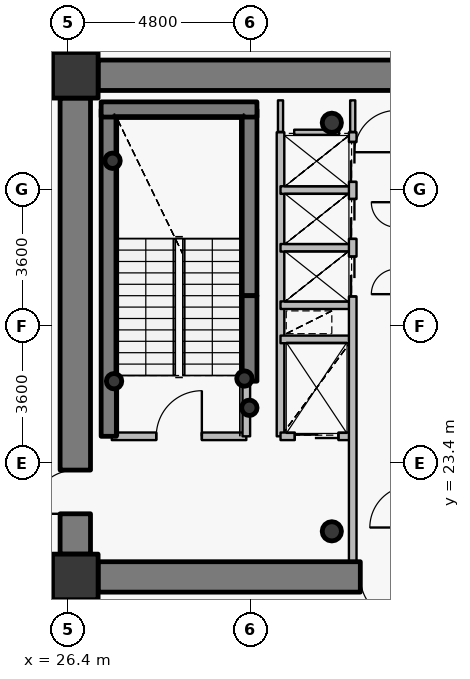
"""IFC4 building model, lengths in metres.
Left out: names, types, materials, properties, quantities, classifications, styles, units other than length and angle.
Written with IfcOpenShell. Run it as: python <this file> out.ifc"""

import sys

from ifc_helpers import new_model, si_unit, direction, frame, frame_2d, origin, origin_2d, place, context, subcontext, project, spatial, rectangle, hollow_circle, extrude, source, transform, mapped, element, fill, save


model = new_model("IFC4")
c1 = context("Model", 3, precision=1e-05, world=origin(), true_north=direction((0.0, 1.0)))
c2 = subcontext(c1, "Body", "Model", "MODEL_VIEW")
j1 = project(units=[si_unit("LENGTHUNIT", "METRE"), si_unit("PLANEANGLEUNIT", "RADIAN")], contexts=[c1])
p1 = place(None, origin())
s1 = spatial("IfcSite", under=j1, at=p1, CompositionType="ELEMENT")
p2 = place(p1, origin())
s2 = spatial("IfcBuilding", under=s1, at=p2, CompositionType="ELEMENT")
p3 = place(p2, frame((0.0, 0.0, 171.15)))
s3 = spatial("IfcBuildingStorey", under=s2, at=p3, CompositionType="ELEMENT", Elevation=171.15)
for number, where, z_axis, x_axis in (
    (1, (26.6, 20.4, 0.0), (0.0, 0.0, 1.0), (1.0, 0.0, 0.0)),
    (2, (26.6, 33.6, 0.0), (0.0, 0.0, 1.0), (1.0, 0.0, 0.0)),
):
    element("IfcColumn", number, at=place(p3, frame(where, z_axis=z_axis, x_axis=x_axis)), inside=s3, PredefinedType="COLUMN", context=c2, shape_type="SweptSolid", body=[
        extrude(rectangle(XDim=1.2, YDim=1.2, at=origin_2d()), origin(), (0.0, 0.0, 1.0), 3.75),
    ])
for number, where, z_axis, x_axis in (
    (3, (33.35, 21.6, 0.0), (0.0, 0.0, 1.0), (1.0, 0.0, 0.0)),
    (4, (33.35, 32.35, 0.0), (0.0, 0.0, 1.0), (1.0, 0.0, 0.0)),
):
    element("IfcColumn", number, at=place(p3, frame(where, z_axis=z_axis, x_axis=x_axis)), inside=s3, PredefinedType="COLUMN", context=c2, shape_type="SweptSolid", body=[
        extrude(hollow_circle(Radius=0.254, WallThickness=0.02, at=origin_2d()), origin(), (0.0, 0.0, 1.0), 3.75),
    ])
p4 = place(p3, frame((27.48, 24.1, 0.0), z_axis=(0.0, 0.0, 1.0), x_axis=(0.0, 1.0, 0.0)))
e5 = element("IfcWall", 5, at=p4, inside=s3, PredefinedType="SHEAR", context=c2, shape_type="SweptSolid", body=[
    extrude(rectangle(XDim=8.6, YDim=0.4, at=frame_2d((4.3, 0.0))), origin(), (0.0, 0.0, 1.0), 3.75),
])
p5 = place(p3, frame((31.18, 27.8, 0.0), z_axis=(0.0, 0.0, 1.0), x_axis=(0.0, 1.0, 0.0)))
e6 = element("IfcWall", 6, at=p5, inside=s3, PredefinedType="SHEAR", context=c2, shape_type="SweptSolid", body=[
    extrude(rectangle(XDim=4.9, YDim=0.4, at=frame_2d((2.45, 0.0))), origin(), (0.0, 0.0, 1.0), 3.75),
])
p6 = place(p3, frame((27.28, 32.7, 0.0), z_axis=(0.0, 0.0, 1.0), x_axis=(1.0, 0.0, 0.0)))
e7 = element("IfcWall", 7, at=p6, inside=s3, PredefinedType="SHEAR", context=c2, shape_type="SweptSolid", body=[
    extrude(rectangle(XDim=4.1, YDim=0.4, at=frame_2d((2.05, 0.0))), origin(), (0.0, 0.0, 1.0), 3.75),
])
for number, where, z_axis, x_axis in (
    (8, (27.58, 31.35, 0.0), (0.0, 0.0, 1.0), (1.0, 0.0, 0.0)),
    (9, (31.05, 25.62, 0.0), (0.0, 0.0, 1.0), (1.0, 0.0, 0.0)),
    (10, (31.18, 24.85, 0.0), (0.0, 0.0, 1.0), (1.0, 0.0, 0.0)),
    (11, (27.62, 25.55, 0.0), (0.0, 0.0, 1.0), (1.0, 0.0, 0.0)),
):
    element("IfcColumn", number, at=place(p3, frame(where, z_axis=z_axis, x_axis=x_axis)), inside=s3, PredefinedType="COLUMN", context=c2, shape_type="SweptSolid", body=[
        extrude(hollow_circle(Radius=0.203, WallThickness=0.016, at=origin_2d()), origin(), (0.0, 0.0, 1.0), 3.75),
    ])
p7 = place(p3, frame((27.2, 33.6, 0.0), z_axis=(0.0, 0.0, 1.0), x_axis=(1.0, 0.0, 0.0)))
e12 = element("IfcWall", 12, at=p7, inside=s3, PredefinedType="SHEAR", context=c2, shape_type="SweptSolid", body=[
    extrude(rectangle(XDim=17.6, YDim=0.8, at=frame_2d((8.8, 0.0))), origin(), (0.0, 0.0, 1.0), 2.95),
])
p8 = place(p7, frame((13.45, 0.0, 0.0)))
e13 = element("IfcOpeningElement", 13, at=p8, cuts=e12, PredefinedType="OPENING", context=c2, shape_type="SweptSolid", body=[
    extrude(rectangle(XDim=1.15, YDim=2.15, at=origin_2d()), frame((0.575, 0.41, 1.075), z_axis=(0.0, -1.0, 0.0), x_axis=(1.0, 0.0, 0.0)), (0.0, 0.0, 1.0), 0.82),
])
p9 = place(p3, frame((44.8, 20.4, 0.0), z_axis=(0.0, 0.0, 1.0), x_axis=(-1.0, 0.0, 0.0)))
e14 = element("IfcWall", 14, at=p9, inside=s3, PredefinedType="SHEAR", context=c2, shape_type="SweptSolid", body=[
    extrude(rectangle(XDim=17.6, YDim=0.8, at=frame_2d((8.8, 0.0))), origin(), (0.0, 0.0, 1.0), 2.95),
])
p10 = place(p9, frame((9.55, 0.0, 0.0)))
e15 = element("IfcOpeningElement", 15, at=p10, cuts=e14, PredefinedType="OPENING", context=c2, shape_type="SweptSolid", body=[
    extrude(rectangle(XDim=1.15, YDim=2.15, at=origin_2d()), frame((0.575, 0.41, 1.075), z_axis=(0.0, -1.0, 0.0), x_axis=(1.0, 0.0, 0.0)), (0.0, 0.0, 1.0), 0.82),
])
p11 = place(p3, frame((26.6, 21.0, 0.0), z_axis=(0.0, 0.0, 1.0), x_axis=(0.0, 1.0, 0.0)))
e16 = element("IfcWall", 16, at=p11, inside=s3, PredefinedType="SHEAR", context=c2, shape_type="SweptSolid", body=[
    extrude(rectangle(XDim=12.0, YDim=0.8, at=frame_2d((6.0, 0.0))), origin(), (0.0, 0.0, 1.0), 2.95),
])
p12 = place(p11, frame((1.061, 0.0, 0.0)))
e17 = element("IfcOpeningElement", 17, at=p12, cuts=e16, PredefinedType="OPENING", context=c2, shape_type="SweptSolid", body=[
    extrude(rectangle(XDim=1.15, YDim=2.15, at=origin_2d()), frame((0.575, 0.41, 1.075), z_axis=(0.0, -1.0, 0.0), x_axis=(1.0, 0.0, 0.0)), (0.0, 0.0, 1.0), 0.82),
])
p13 = place(p3, frame((31.18, 25.55, 0.0), z_axis=(0.0, 0.0, 1.0), x_axis=(0.0, 1.0, 0.0)))
e18 = element("IfcWall", 18, at=p13, inside=s3, PredefinedType="SHEAR", context=c2, shape_type="SweptSolid", body=[
    extrude(rectangle(XDim=2.25, YDim=0.4, at=frame_2d((1.125, 0.0))), origin(), (0.0, 0.0, 1.0), 3.1),
])
p14 = place(p3, frame((27.56, 24.1, 0.0), z_axis=(0.0, 0.0, 1.0), x_axis=(1.0, 0.0, 0.0)))
e19 = element("IfcWall", 19, at=p14, inside=s3, PredefinedType="PARTITIONING", context=c2, shape_type="SweptSolid", body=[
    extrude(rectangle(XDim=3.54, YDim=0.2, at=frame_2d((1.77, 0.0))), origin(), (0.0, 0.0, 1.0), 3.5),
])
p15 = place(p14, frame((1.17, 0.0, 0.0)))
e20 = element("IfcOpeningElement", 20, at=p15, cuts=e19, PredefinedType="OPENING", context=c2, shape_type="SweptSolid", body=[
    extrude(rectangle(XDim=1.2, YDim=2.15, at=origin_2d()), frame((0.6, 0.11, 1.075), z_axis=(0.0, -1.0, 0.0), x_axis=(1.0, 0.0, 0.0)), (0.0, 0.0, 1.0), 0.22),
])
p16 = place(p3, frame((31.1, 24.1, 0.0), z_axis=(0.0, 0.0, 1.0), x_axis=(0.0, 1.0, 0.0)))
e21 = element("IfcWall", 21, at=p16, inside=s3, PredefinedType="PARTITIONING", context=c2, shape_type="SweptSolid", body=[
    extrude(rectangle(XDim=1.44, YDim=0.2, at=frame_2d((0.72, 0.0))), origin(), (0.0, 0.0, 1.0), 3.5),
])
p17 = place(p3, frame((32.0, 24.1, 0.0), z_axis=(0.0, 0.0, 1.0), x_axis=(0.0, 1.0, 0.0)))
e22 = element("IfcWall", 22, at=p17, inside=s3, PredefinedType="PARTITIONING", context=c2, shape_type="SweptSolid", body=[
    extrude(rectangle(XDim=8.0, YDim=0.2, at=frame_2d((4.0, 0.0))), origin(), (0.0, 0.0, 1.0), 3.5),
])
p18 = place(p3, frame((32.0, 24.1, 0.0), z_axis=(0.0, 0.0, 1.0), x_axis=(1.0, 0.0, 0.0)))
e23 = element("IfcWall", 23, at=p18, inside=s3, PredefinedType="PARTITIONING", context=c2, shape_type="SweptSolid", body=[
    extrude(rectangle(XDim=1.9, YDim=0.2, at=frame_2d((0.95, 0.0))), origin(), (0.0, 0.0, 1.0), 3.085),
])
p19 = place(p18, frame((0.375, 0.0, 0.0)))
e24 = element("IfcOpeningElement", 24, at=p19, cuts=e23, PredefinedType="OPENING", context=c2, shape_type="SweptSolid", body=[
    extrude(rectangle(XDim=1.15, YDim=2.15, at=origin_2d()), frame((0.575, 0.11, 1.075), z_axis=(0.0, -1.0, 0.0), x_axis=(1.0, 0.0, 0.0)), (0.0, 0.0, 1.0), 0.22),
])
for number, where, z_axis, x_axis in (
    (25, (32.0, 26.65, 0.0), (0.0, 0.0, 1.0), (1.0, 0.0, 0.0)),
    (26, (32.0, 27.55, 0.0), (0.0, 0.0, 1.0), (1.0, 0.0, 0.0)),
    (27, (32.0, 29.06, 0.0), (0.0, 0.0, 1.0), (1.0, 0.0, 0.0)),
    (28, (32.0, 30.58, 0.0), (0.0, 0.0, 1.0), (1.0, 0.0, 0.0)),
):
    element("IfcWall", number, at=place(p3, frame(where, z_axis=z_axis, x_axis=x_axis)), inside=s3, PredefinedType="PARTITIONING", context=c2, shape_type="SweptSolid", body=[
        extrude(rectangle(XDim=1.9, YDim=0.2, at=frame_2d((0.95, 0.0))), origin(), (0.0, 0.0, 1.0), 3.085),
    ])
p20 = place(p3, frame((33.9, 20.8, 0.0), z_axis=(0.0, 0.0, 1.0), x_axis=(0.0, 1.0, 0.0)))
e29 = element("IfcWall", 29, at=p20, inside=s3, PredefinedType="PARTITIONING", context=c2, shape_type="SweptSolid", body=[
    extrude(rectangle(XDim=11.3, YDim=0.2, at=frame_2d((5.65, 0.0))), origin(), (0.0, 0.0, 1.0), 3.085),
])
p21 = place(p20, frame((6.98, 0.0, 0.0)))
e30 = element("IfcOpeningElement", 30, at=p21, cuts=e29, PredefinedType="OPENING", context=c2, shape_type="SweptSolid", body=[
    extrude(rectangle(XDim=1.05, YDim=2.15, at=origin_2d()), frame((0.525, 0.11, 1.075), z_axis=(0.0, -1.0, 0.0), x_axis=(1.0, 0.0, 0.0)), (0.0, 0.0, 1.0), 0.22),
])
p22 = place(p20, frame((8.495, 0.0, 0.0)))
e31 = element("IfcOpeningElement", 31, at=p22, cuts=e29, PredefinedType="OPENING", context=c2, shape_type="SweptSolid", body=[
    extrude(rectangle(XDim=1.05, YDim=2.15, at=origin_2d()), frame((0.525, 0.11, 1.075), z_axis=(0.0, -1.0, 0.0), x_axis=(1.0, 0.0, 0.0)), (0.0, 0.0, 1.0), 0.22),
])
p23 = place(p20, frame((9.995, 0.0, 0.0)))
e32 = element("IfcOpeningElement", 32, at=p23, cuts=e29, PredefinedType="OPENING", context=c2, shape_type="SweptSolid", body=[
    extrude(rectangle(XDim=1.05, YDim=2.15, at=origin_2d()), frame((0.525, 0.11, 1.075), z_axis=(0.0, -1.0, 0.0), x_axis=(1.0, 0.0, 0.0)), (0.0, 0.0, 1.0), 0.22),
])
p24 = place(p3, frame((32.36, 32.1, 0.0), z_axis=(0.0, 0.0, 1.0), x_axis=(1.0, 0.0, 0.0)))
e33 = element("IfcWall", 33, at=p24, inside=s3, PredefinedType="PARTITIONING", context=c2, shape_type="SweptSolid", body=[
    extrude(rectangle(XDim=1.18, YDim=0.135, at=frame_2d((0.59, 0.0))), origin(), (0.0, 0.0, 1.0), 3.085),
])
p25 = place(p3, frame((32.0, 32.94, 0.0), z_axis=(0.0, 0.0, 1.0), x_axis=(0.0, -1.0, 0.0)))
e34 = element("IfcWall", 34, at=p25, inside=s3, PredefinedType="PARTITIONING", context=c2, shape_type="SweptSolid", body=[
    extrude(rectangle(XDim=0.83, YDim=0.135, at=frame_2d((0.415, 0.0))), origin(), (0.0, 0.0, 1.0), 3.035),
])
p26 = place(p3, frame((33.9, 32.11, 0.0), z_axis=(0.0, 0.0, 1.0), x_axis=(0.0, 1.0, 0.0)))
e35 = element("IfcWall", 35, at=p26, inside=s3, PredefinedType="PARTITIONING", context=c2, shape_type="SweptSolid", body=[
    extrude(rectangle(XDim=0.83, YDim=0.135, at=frame_2d((0.415, 0.0))), origin(), (0.0, 0.0, 1.0), 3.085),
])
p27 = place(p3, frame((27.19, 34.0, 0.0), z_axis=(0.0, 0.0, 1.0), x_axis=(-1.0, 0.0, 0.0)))
e36 = element("IfcWall", 36, at=p27, inside=s3, PredefinedType="PARTITIONING", context=c2, shape_type="SweptSolid", body=[
    extrude(rectangle(XDim=0.99, YDim=0.135, at=frame_2d((0.495, 0.0))), origin(), (0.0, 0.0, 1.0), 2.935),
])
p28 = place(p3, frame((26.2, 33.692, 0.0), z_axis=(0.0, 0.0, 1.0), x_axis=(0.0, -1.0, 0.0)))
e37 = element("IfcWall", 37, at=p28, inside=s3, PredefinedType="PARTITIONING", context=c2, shape_type="SweptSolid", body=[
    extrude(rectangle(XDim=0.682, YDim=0.135, at=frame_2d((0.341, 0.0))), origin(), (0.0, 0.0, 1.0), 3.5),
])
p29 = place(p3, frame((26.2, 20.99, 0.0), z_axis=(0.0, 0.0, 1.0), x_axis=(0.0, -1.0, 0.0)))
e38 = element("IfcWall", 38, at=p29, inside=s3, PredefinedType="PARTITIONING", context=c2, shape_type="SweptSolid", body=[
    extrude(rectangle(XDim=0.99, YDim=0.135, at=frame_2d((0.495, 0.0))), origin(), (0.0, 0.0, 1.0), 3.5),
])
p30 = place(p3, frame((26.508, 20.0, 0.0), z_axis=(0.0, 0.0, 1.0), x_axis=(1.0, 0.0, 0.0)))
e39 = element("IfcWall", 39, at=p30, inside=s3, PredefinedType="PARTITIONING", context=c2, shape_type="SweptSolid", body=[
    extrude(rectangle(XDim=0.682, YDim=0.135, at=frame_2d((0.341, 0.0))), origin(), (0.0, 0.0, 1.0), 2.935),
])
m1 = source(origin(), c2, "Body", "SweptSolid", [
    extrude(rectangle(XDim=1.15, YDim=2.15, at=origin_2d()), frame((0.575, 0.025, 1.075), z_axis=(0.0, -1.0, 0.0), x_axis=(1.0, 0.0, 0.0)), (0.0, 0.0, 1.0), 0.05),
])
p31 = place(p12, origin())
e40 = element("IfcDoor", 40, at=p31, inside=s3, OperationType="SINGLE_SWING_LEFT", PredefinedType="DOOR", context=c2, shape_type="MappedRepresentation", body=[
    mapped(m1, transform((0.0, 0.0, 0.0), x_axis=(1.0, 0.0, 0.0), y_axis=(0.0, 1.0, 0.0), z_axis=(0.0, 0.0, 1.0), scale=1.0)),
])
fill(e17, e40)
p32 = place(p10, origin())
e41 = element("IfcDoor", 41, at=p32, inside=s3, OperationType="SINGLE_SWING_LEFT", PredefinedType="DOOR", context=c2, shape_type="MappedRepresentation", body=[
    mapped(m1, transform((0.0, 0.0, 0.0), x_axis=(1.0, 0.0, 0.0), y_axis=(0.0, 1.0, 0.0), z_axis=(0.0, 0.0, 1.0), scale=1.0)),
])
fill(e15, e41)
m2 = source(origin(), c2, "Body", "SweptSolid", [
    extrude(rectangle(XDim=1.2, YDim=2.15, at=origin_2d()), frame((0.6, 0.025, 1.075), z_axis=(0.0, -1.0, 0.0), x_axis=(1.0, 0.0, 0.0)), (0.0, 0.0, 1.0), 0.05),
])
p33 = place(p15, origin())
e42 = element("IfcDoor", 42, at=p33, inside=s3, OperationType="SINGLE_SWING_RIGHT", PredefinedType="DOOR", context=c2, shape_type="MappedRepresentation", body=[
    mapped(m2, transform((0.0, 0.0, 0.0), x_axis=(1.0, 0.0, 0.0), y_axis=(0.0, 1.0, 0.0), z_axis=(0.0, 0.0, 1.0), scale=1.0)),
])
fill(e20, e42)
m3 = source(origin(), c2, "Body", "SweptSolid", [
    extrude(rectangle(XDim=1.15, YDim=2.15, at=origin_2d()), frame((0.575, 0.025, 1.075), z_axis=(0.0, -1.0, 0.0), x_axis=(1.0, 0.0, 0.0)), (0.0, 0.0, 1.0), 0.05),
])
p34 = place(p19, origin())
e43 = element("IfcDoor", 43, at=p34, inside=s3, OperationType="DOUBLE_DOOR_SLIDING", PredefinedType="USERDEFINED", context=c2, shape_type="MappedRepresentation", body=[
    mapped(m3, transform((0.0, 0.0, 0.0), x_axis=(1.0, 0.0, 0.0), y_axis=(0.0, 1.0, 0.0), z_axis=(0.0, 0.0, 1.0), scale=1.0)),
])
fill(e24, e43)
m4 = source(origin(), c2, "Body", "SweptSolid", [
    extrude(rectangle(XDim=1.05, YDim=2.15, at=origin_2d()), frame((0.525, 0.025, 1.075), z_axis=(0.0, -1.0, 0.0), x_axis=(1.0, 0.0, 0.0)), (0.0, 0.0, 1.0), 0.05),
])
p35 = place(p21, origin())
e44 = element("IfcDoor", 44, at=p35, inside=s3, OperationType="DOUBLE_DOOR_SLIDING", PredefinedType="USERDEFINED", context=c2, shape_type="MappedRepresentation", body=[
    mapped(m4, transform((0.0, 0.0, 0.0), x_axis=(1.0, 0.0, 0.0), y_axis=(0.0, 1.0, 0.0), z_axis=(0.0, 0.0, 1.0), scale=1.0)),
])
fill(e30, e44)
p36 = place(p22, origin())
e45 = element("IfcDoor", 45, at=p36, inside=s3, OperationType="DOUBLE_DOOR_SLIDING", PredefinedType="USERDEFINED", context=c2, shape_type="MappedRepresentation", body=[
    mapped(m4, transform((0.0, 0.0, 0.0), x_axis=(1.0, 0.0, 0.0), y_axis=(0.0, 1.0, 0.0), z_axis=(0.0, 0.0, 1.0), scale=1.0)),
])
fill(e31, e45)
p37 = place(p23, origin())
e46 = element("IfcDoor", 46, at=p37, inside=s3, OperationType="DOUBLE_DOOR_SLIDING", PredefinedType="USERDEFINED", context=c2, shape_type="MappedRepresentation", body=[
    mapped(m4, transform((0.0, 0.0, 0.0), x_axis=(1.0, 0.0, 0.0), y_axis=(0.0, 1.0, 0.0), z_axis=(0.0, 0.0, 1.0), scale=1.0)),
])
fill(e32, e46)
save(model, sys.argv[1])
